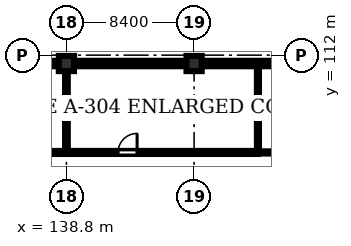
"""IFC4 building model, lengths in metres.
Left out: names, types, materials, properties, quantities, classifications, styles, units other than length and angle.
Written with IfcOpenShell. Run it as: python <this file> out.ifc"""

import sys

from ifc_helpers import new_model, si_unit, direction, frame, frame_2d, origin, origin_2d, place, context, subcontext, project, spatial, rectangle, extrude, element, fill, save


model = new_model("IFC4")
c1 = context("Model", 3, precision=1e-05, world=origin(), true_north=direction((0.0, 1.0)))
c2 = subcontext(c1, "Body", "Model", "MODEL_VIEW")
j1 = project(units=[si_unit("LENGTHUNIT", "METRE"), si_unit("PLANEANGLEUNIT", "RADIAN")], contexts=[c1])
p1 = place(None, origin())
s1 = spatial("IfcSite", under=j1, at=p1, CompositionType="ELEMENT")
p2 = place(p1, origin())
s2 = spatial("IfcBuilding", under=s1, at=p2, CompositionType="ELEMENT")
p3 = place(p2, frame((0.0, 0.0, 5.4)))
s3 = spatial("IfcBuildingStorey", under=s2, at=p3, CompositionType="ELEMENT", Elevation=5.4)
for number, where, z_axis, x_axis in (
    (1, (138.8, 111.45, 0.0), (0.0, 0.0, 1.0), (1.0, 0.0, 0.0)),
    (2, (147.2, 111.45, 0.0), (0.0, 0.0, 1.0), (1.0, 0.0, 0.0)),
):
    element("IfcColumn", number, at=place(p3, frame(where, z_axis=z_axis, x_axis=x_axis)), inside=s3, PredefinedType="COLUMN", context=c2, shape_type="SweptSolid", body=[
        extrude(rectangle(XDim=1.0, YDim=1.0, at=origin_2d()), origin(), (0.0, 0.0, 1.0), 4.58),
    ])
p4 = place(p3, frame((130.9, 111.45, 0.0), z_axis=(0.0, 0.0, 1.0), x_axis=(1.0, 0.0, 0.0)))
e3 = element("IfcWall", 3, at=p4, inside=s3, PredefinedType="STANDARD", context=c2, shape_type="SweptSolid", body=[
    extrude(rectangle(XDim=7.4, YDim=0.36, at=frame_2d((3.7, 0.0))), origin(), (0.0, 0.0, 1.0), 3.83),
])
p5 = place(p4, frame((1.3, 0.0, 1.1)))
e4 = element("IfcOpeningElement", 4, at=p5, cuts=e3, PredefinedType="OPENING", context=c2, shape_type="SweptSolid", body=[
    extrude(rectangle(XDim=1.2, YDim=1.5, at=frame_2d((0.6, 0.75))), frame((0.0, 0.19, 0.0), z_axis=(0.0, -1.0, 0.0), x_axis=(1.0, 0.0, 0.0)), (0.0, 0.0, 1.0), 0.38),
])
p6 = place(p4, frame((5.1, 0.0, 1.1)))
e5 = element("IfcOpeningElement", 5, at=p6, cuts=e3, PredefinedType="OPENING", context=c2, shape_type="SweptSolid", body=[
    extrude(rectangle(XDim=1.2, YDim=1.5, at=frame_2d((0.6, 0.75))), frame((0.0, 0.19, 0.0), z_axis=(0.0, -1.0, 0.0), x_axis=(1.0, 0.0, 0.0)), (0.0, 0.0, 1.0), 0.38),
])
p7 = place(p3, frame((139.3, 111.45, 0.0), z_axis=(0.0, 0.0, 1.0), x_axis=(1.0, 0.0, 0.0)))
e6 = element("IfcWall", 6, at=p7, inside=s3, PredefinedType="STANDARD", context=c2, shape_type="SweptSolid", body=[
    extrude(rectangle(XDim=7.4, YDim=0.36, at=frame_2d((3.7, 0.0))), origin(), (0.0, 0.0, 1.0), 3.83),
])
p8 = place(p7, frame((1.3, 0.0, 1.1)))
e7 = element("IfcOpeningElement", 7, at=p8, cuts=e6, PredefinedType="OPENING", context=c2, shape_type="SweptSolid", body=[
    extrude(rectangle(XDim=1.2, YDim=1.5, at=frame_2d((0.6, 0.75))), frame((0.0, 0.19, 0.0), z_axis=(0.0, -1.0, 0.0), x_axis=(1.0, 0.0, 0.0)), (0.0, 0.0, 1.0), 0.38),
])
p9 = place(p7, frame((5.1, 0.0, 1.1)))
e8 = element("IfcOpeningElement", 8, at=p9, cuts=e6, PredefinedType="OPENING", context=c2, shape_type="SweptSolid", body=[
    extrude(rectangle(XDim=1.2, YDim=1.5, at=frame_2d((0.6, 0.75))), frame((0.0, 0.19, 0.0), z_axis=(0.0, -1.0, 0.0), x_axis=(1.0, 0.0, 0.0)), (0.0, 0.0, 1.0), 0.38),
])
p10 = place(p3, frame((147.7, 111.45, 0.0), z_axis=(0.0, 0.0, 1.0), x_axis=(1.0, 0.0, 0.0)))
e9 = element("IfcWall", 9, at=p10, inside=s3, PredefinedType="STANDARD", context=c2, shape_type="SweptSolid", body=[
    extrude(rectangle(XDim=7.4, YDim=0.36, at=frame_2d((3.7, 0.0))), origin(), (0.0, 0.0, 1.0), 3.83),
])
p11 = place(p10, frame((1.3, 0.0, 1.1)))
e10 = element("IfcOpeningElement", 10, at=p11, cuts=e9, PredefinedType="OPENING", context=c2, shape_type="SweptSolid", body=[
    extrude(rectangle(XDim=1.2, YDim=1.5, at=frame_2d((0.6, 0.75))), frame((0.0, 0.19, 0.0), z_axis=(0.0, -1.0, 0.0), x_axis=(1.0, 0.0, 0.0)), (0.0, 0.0, 1.0), 0.38),
])
p12 = place(p10, frame((5.1, 0.0, 1.1)))
e11 = element("IfcOpeningElement", 11, at=p12, cuts=e9, PredefinedType="OPENING", context=c2, shape_type="SweptSolid", body=[
    extrude(rectangle(XDim=1.2, YDim=1.5, at=frame_2d((0.6, 0.75))), frame((0.0, 0.19, 0.0), z_axis=(0.0, -1.0, 0.0), x_axis=(1.0, 0.0, 0.0)), (0.0, 0.0, 1.0), 0.38),
])
p13 = place(p3, frame((122.15, 105.6, 0.0), z_axis=(0.0, 0.0, 1.0), x_axis=(1.0, 0.0, 0.0)))
e12 = element("IfcWall", 12, at=p13, inside=s3, PredefinedType="SOLIDWALL", context=c2, shape_type="SweptSolid", body=[
    extrude(rectangle(XDim=16.65, YDim=0.2, at=frame_2d((8.325, 0.0))), origin(), (0.0, 0.0, 1.0), 4.58),
])
p14 = place(p13, frame((3.75, 0.0, 0.0)))
e13 = element("IfcOpeningElement", 13, at=p14, cuts=e12, PredefinedType="OPENING", context=c2, shape_type="SweptSolid", body=[
    extrude(rectangle(XDim=1.5, YDim=2.2, at=frame_2d((0.75, 1.1))), frame((0.0, 0.11, 0.0), z_axis=(0.0, -1.0, 0.0), x_axis=(1.0, 0.0, 0.0)), (0.0, 0.0, 1.0), 0.22),
])
p15 = place(p3, frame((138.8, 105.6, 0.0), z_axis=(0.0, 0.0, 1.0), x_axis=(1.0, 0.0, 0.0)))
e14 = element("IfcWall", 14, at=p15, inside=s3, PredefinedType="SOLIDWALL", context=c2, shape_type="SweptSolid", body=[
    extrude(rectangle(XDim=12.6, YDim=0.2, at=frame_2d((6.3, 0.0))), origin(), (0.0, 0.0, 1.0), 4.58),
])
p16 = place(p15, frame((3.4, 0.0, 0.0)))
e15 = element("IfcOpeningElement", 15, at=p16, cuts=e14, PredefinedType="OPENING", context=c2, shape_type="SweptSolid", body=[
    extrude(rectangle(XDim=1.25, YDim=2.2, at=frame_2d((0.625, 1.1))), frame((0.0, 0.11, 0.0), z_axis=(0.0, -1.0, 0.0), x_axis=(1.0, 0.0, 0.0)), (0.0, 0.0, 1.0), 0.22),
])
p17 = place(p3, frame((138.8, 105.6, 0.0), z_axis=(0.0, 0.0, 1.0), x_axis=(0.0, 1.0, 0.0)))
e16 = element("IfcWall", 16, at=p17, inside=s3, PredefinedType="STANDARD", context=c2, shape_type="SweptSolid", body=[
    extrude(rectangle(XDim=5.75, YDim=0.18, at=frame_2d((2.875, 0.0))), origin(), (0.0, 0.0, 1.0), 3.83),
])
p18 = place(p3, frame((151.4, 105.6, 0.0), z_axis=(0.0, 0.0, 1.0), x_axis=(1.0, 0.0, 0.0)))
e17 = element("IfcWall", 17, at=p18, inside=s3, PredefinedType="PARTITIONING", context=c2, shape_type="SweptSolid", body=[
    extrude(rectangle(XDim=11.95, YDim=0.145, at=frame_2d((5.975, 0.0))), origin(), (0.0, 0.0, 1.0), 4.58),
])
p19 = place(p18, frame((6.8, 0.0, 0.0)))
e18 = element("IfcOpeningElement", 18, at=p19, cuts=e17, PredefinedType="OPENING", context=c2, shape_type="SweptSolid", body=[
    extrude(rectangle(XDim=1.02, YDim=2.15, at=frame_2d((0.51, 1.075))), frame((0.0, 0.083, 0.0), z_axis=(0.0, -1.0, 0.0), x_axis=(1.0, 0.0, 0.0)), (0.0, 0.0, 1.0), 0.165),
])
p20 = place(p3, frame((151.4, 105.6, 0.0), z_axis=(0.0, 0.0, 1.0), x_axis=(0.0, 1.0, 0.0)))
e19 = element("IfcWall", 19, at=p20, inside=s3, PredefinedType="PARTITIONING", context=c2, shape_type="SweptSolid", body=[
    extrude(rectangle(XDim=5.75, YDim=0.135, at=frame_2d((2.875, 0.0))), origin(), (0.0, 0.0, 1.0), 4.03),
])
p21 = place(p8, origin())
e20 = element("IfcWindow", 20, at=p21, inside=s3, PartitioningType="SINGLE_PANEL", PredefinedType="WINDOW", context=c2, shape_type="SweptSolid", body=[
    extrude(rectangle(XDim=1.2, YDim=1.5, at=frame_2d((0.6, 0.75))), frame((0.0, 0.03, 0.0), z_axis=(0.0, -1.0, 0.0), x_axis=(1.0, 0.0, 0.0)), (0.0, 0.0, 1.0), 0.06),
])
fill(e7, e20)
p22 = place(p9, origin())
e21 = element("IfcWindow", 21, at=p22, inside=s3, PartitioningType="SINGLE_PANEL", PredefinedType="WINDOW", context=c2, shape_type="SweptSolid", body=[
    extrude(rectangle(XDim=1.2, YDim=1.5, at=frame_2d((0.6, 0.75))), frame((0.0, 0.03, 0.0), z_axis=(0.0, -1.0, 0.0), x_axis=(1.0, 0.0, 0.0)), (0.0, 0.0, 1.0), 0.06),
])
fill(e8, e21)
p23 = place(p11, origin())
e22 = element("IfcWindow", 22, at=p23, inside=s3, PartitioningType="SINGLE_PANEL", PredefinedType="WINDOW", context=c2, shape_type="SweptSolid", body=[
    extrude(rectangle(XDim=1.2, YDim=1.5, at=frame_2d((0.6, 0.75))), frame((0.0, 0.03, 0.0), z_axis=(0.0, -1.0, 0.0), x_axis=(1.0, 0.0, 0.0)), (0.0, 0.0, 1.0), 0.06),
])
fill(e10, e22)
p24 = place(p16, origin())
e23 = element("IfcDoor", 23, at=p24, inside=s3, OperationType="SINGLE_SWING_RIGHT", PredefinedType="DOOR", context=c2, shape_type="SweptSolid", body=[
    extrude(rectangle(XDim=1.25, YDim=2.2, at=frame_2d((0.625, 1.1))), frame((0.0, 0.025, 0.0), z_axis=(0.0, -1.0, 0.0), x_axis=(1.0, 0.0, 0.0)), (0.0, 0.0, 1.0), 0.05),
])
fill(e15, e23)
save(model, sys.argv[1])
